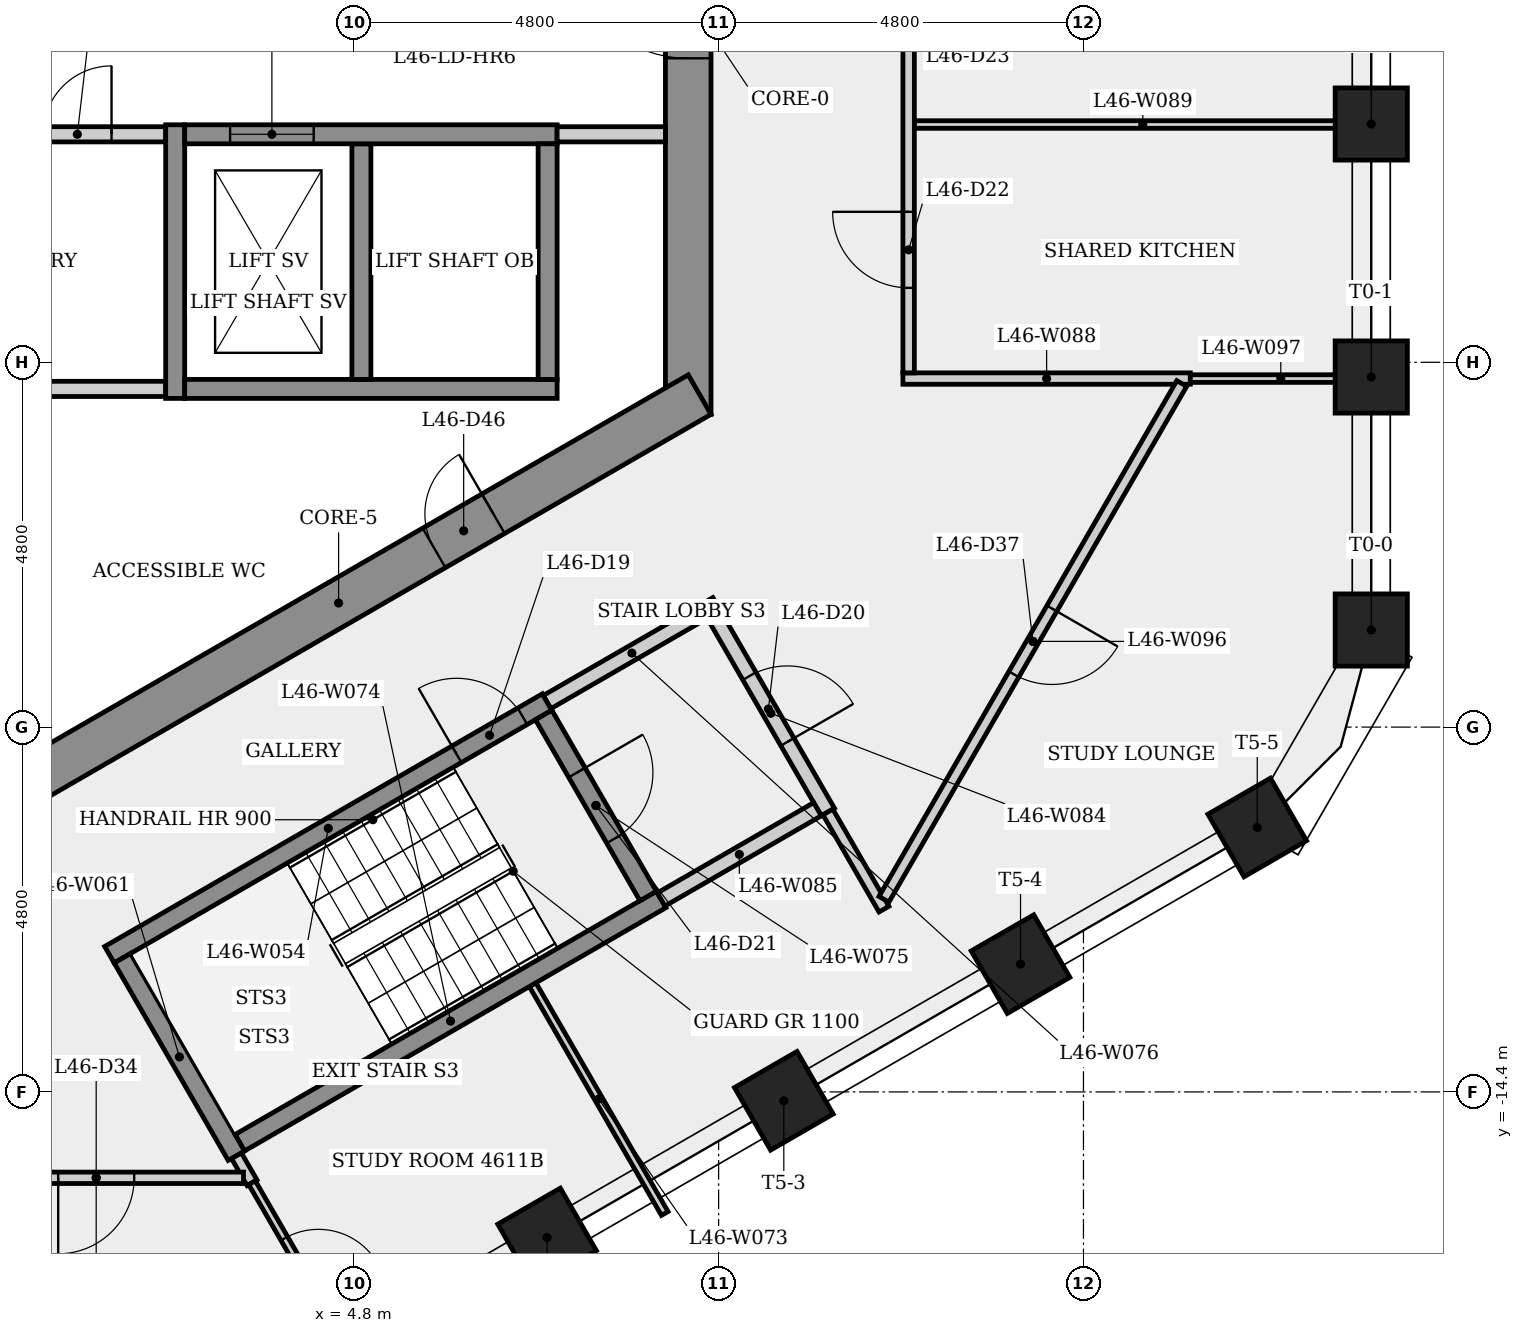
"""IFC4 building model, lengths in metres.
Left out: names, types, materials, properties, quantities, classifications, styles, units other than length and angle.
Written with IfcOpenShell. Run it as: python <this file> out.ifc"""

import sys

from ifc_helpers import new_model, si_unit, direction, frame, frame_2d, origin, origin_2d, place, context, subcontext, project, spatial, rectangle, extrude, element, fill, save


model = new_model("IFC4")
c1 = context("Model", 3, precision=1e-05, world=origin(), true_north=direction((0.0, 1.0)))
c2 = subcontext(c1, "Body", "Model", "MODEL_VIEW")
j1 = project(units=[si_unit("LENGTHUNIT", "METRE"), si_unit("PLANEANGLEUNIT", "RADIAN")], contexts=[c1])
p1 = place(None, origin())
s1 = spatial("IfcSite", under=j1, at=p1, CompositionType="ELEMENT")
p2 = place(p1, origin())
s2 = spatial("IfcBuilding", under=s1, at=p2, CompositionType="ELEMENT")
p3 = place(p2, frame((0.0, 0.0, 173.1)))
s3 = spatial("IfcBuildingStorey", under=s2, at=p3, CompositionType="ELEMENT", Elevation=173.1)
p4 = place(p3, frame((9.2, -5.485, 0.0), z_axis=(0.0, 0.0, 1.0), x_axis=(0.0, 1.0, 0.0)))
e1 = element("IfcWall", 1, at=p4, inside=s3, PredefinedType="SHEAR", context=c2, shape_type="SweptSolid", body=[
    extrude(rectangle(XDim=10.97, YDim=0.6, at=frame_2d((5.485, 0.0))), origin(), (0.0, 0.0, 1.0), 3.4),
])
p5 = place(p4, frame((4.685, 0.0, 0.0)))
e2 = element("IfcOpeningElement", 2, at=p5, cuts=e1, PredefinedType="OPENING", context=c2, shape_type="SweptSolid", body=[
    extrude(rectangle(XDim=1.6, YDim=2.1, at=frame_2d((0.8, 1.05))), frame((0.0, 0.31, 0.0), z_axis=(0.0, -1.0, 0.0), x_axis=(1.0, 0.0, 0.0)), (0.0, 0.0, 1.0), 0.62),
])
p6 = place(p3, frame((-0.15, -10.71, 0.0), z_axis=(0.0, 0.0, 1.0), x_axis=(0.866023993627, 0.500002442456, 0.0)))
e3 = element("IfcWall", 3, at=p6, inside=s3, PredefinedType="SHEAR", context=c2, shape_type="SweptSolid", body=[
    extrude(rectangle(XDim=10.97, YDim=0.6, at=frame_2d((5.485, 0.0))), origin(), (0.0, 0.0, 1.0), 3.4),
])
p7 = place(p6, frame((6.935, 0.0, 0.0)))
e4 = element("IfcOpeningElement", 4, at=p7, cuts=e3, PredefinedType="OPENING", context=c2, shape_type="SweptSolid", body=[
    extrude(rectangle(XDim=0.9, YDim=2.1, at=frame_2d((0.45, 1.05))), frame((0.0, 0.31, 0.0), z_axis=(0.0, -1.0, 0.0), x_axis=(1.0, 0.0, 0.0)), (0.0, 0.0, 1.0), 0.62),
])
for number, where, z_axis, x_axis in (
    (5, (18.187, -8.323, 0.0), (0.0, 0.0, 1.0), (1.0, 0.0, 0.0)),
    (6, (18.187, -4.993, 0.0), (0.0, 0.0, 1.0), (1.0, 0.0, 0.0)),
    (7, (18.187, -1.665, 0.0), (0.0, 0.0, 1.0), (1.0, 0.0, 0.0)),
    (8, (7.343, -16.315, 0.0), (0.0, 0.0, 1.0), (0.5, -0.866, 0.0)),
    (9, (10.458, -14.517, 0.0), (0.0, 0.0, 1.0), (0.5, -0.866, 0.0)),
    (10, (13.572, -12.719, 0.0), (0.0, 0.0, 1.0), (0.5, -0.866, 0.0)),
    (11, (16.687, -10.921, 0.0), (0.0, 0.0, 1.0), (0.5, -0.866, 0.0)),
):
    element("IfcColumn", number, at=place(p3, frame(where, z_axis=z_axis, x_axis=x_axis)), inside=s3, PredefinedType="COLUMN", context=c2, shape_type="SweptSolid", body=[
        extrude(rectangle(XDim=0.95, YDim=0.95, at=origin_2d()), origin(), (0.0, 0.0, 1.0), 3.4),
    ])
p8 = place(p3, frame((-8.88, -5.15, 0.0), z_axis=(0.0, 0.0, 1.0), x_axis=(1.0, 0.0, 0.0)))
e12 = element("IfcWall", 12, at=p8, inside=s3, PredefinedType="PARTITIONING", context=c2, shape_type="SweptSolid", body=[
    extrude(rectangle(XDim=11.205, YDim=0.2, at=frame_2d((5.603, 0.0))), origin(), (0.0, 0.0, 1.0), 3.05),
])
p9 = place(p3, frame((-8.9, -1.8, 0.0), z_axis=(0.0, 0.0, 1.0), x_axis=(1.0, 0.0, 0.0)))
e13 = element("IfcWall", 13, at=p9, inside=s3, PredefinedType="PARTITIONING", context=c2, shape_type="SweptSolid", body=[
    extrude(rectangle(XDim=11.225, YDim=0.2, at=frame_2d((5.613, 0.0))), origin(), (0.0, 0.0, 1.0), 3.05),
])
p10 = place(p9, frame((2.16, 0.0, 0.0)))
e14 = element("IfcOpeningElement", 14, at=p10, cuts=e13, PredefinedType="OPENING", context=c2, shape_type="SweptSolid", body=[
    extrude(rectangle(XDim=0.9, YDim=2.1, at=frame_2d((0.45, 1.05))), frame((0.0, 0.11, 0.0), z_axis=(0.0, -1.0, 0.0), x_axis=(1.0, 0.0, 0.0)), (0.0, 0.0, 1.0), 0.22),
])
p11 = place(p9, frame((6.61, 0.0, 0.0)))
e15 = element("IfcOpeningElement", 15, at=p11, cuts=e13, PredefinedType="OPENING", context=c2, shape_type="SweptSolid", body=[
    extrude(rectangle(XDim=0.9, YDim=2.1, at=frame_2d((0.45, 1.05))), frame((0.0, 0.11, 0.0), z_axis=(0.0, -1.0, 0.0), x_axis=(1.0, 0.0, 0.0)), (0.0, 0.0, 1.0), 0.22),
])
p12 = place(p9, frame((9.613, 0.0, 0.0)))
e16 = element("IfcOpeningElement", 16, at=p12, cuts=e13, PredefinedType="OPENING", context=c2, shape_type="SweptSolid", body=[
    extrude(rectangle(XDim=0.9, YDim=2.1, at=frame_2d((0.45, 1.05))), frame((0.0, 0.11, 0.0), z_axis=(0.0, -1.0, 0.0), x_axis=(1.0, 0.0, 0.0)), (0.0, 0.0, 1.0), 0.22),
])
p13 = place(p3, frame((1.585, -12.595, 0.0), z_axis=(0.0, 0.0, 1.0), x_axis=(0.866036417653, 0.499980922934, 0.0)))
e17 = element("IfcWall", 17, at=p13, inside=s3, PredefinedType="SHEAR", context=c2, shape_type="SweptSolid", body=[
    extrude(rectangle(XDim=6.65, YDim=0.25, at=frame_2d((3.325, 0.0))), origin(), (0.0, 0.0, 1.0), 3.05),
])
p14 = place(p13, frame((5.275, 0.0, 0.0)))
e18 = element("IfcOpeningElement", 18, at=p14, cuts=e17, PredefinedType="OPENING", context=c2, shape_type="SweptSolid", body=[
    extrude(rectangle(XDim=1.0, YDim=2.1, at=frame_2d((0.5, 1.05))), frame((0.0, 0.135, 0.0), z_axis=(0.0, -1.0, 0.0), x_axis=(1.0, 0.0, 0.0)), (0.0, 0.0, 1.0), 0.27),
])
p15 = place(p3, frame((2.45, -5.275, 0.0), z_axis=(0.0, 0.0, 1.0), x_axis=(0.0, 1.0, 0.0)))
e19 = element("IfcWall", 19, at=p15, inside=s3, PredefinedType="SHEAR", context=c2, shape_type="SweptSolid", body=[
    extrude(rectangle(XDim=3.6, YDim=0.25, at=frame_2d((1.8, 0.0))), origin(), (0.0, 0.0, 1.0), 3.05),
])
p16 = place(p3, frame((3.256, -15.239, 0.0), z_axis=(0.0, 0.0, 1.0), x_axis=(0.500030520673, -0.866007781949, 0.0)))
e20 = element("IfcWall", 20, at=p16, inside=s3, PredefinedType="PARTITIONING", context=c2, shape_type="SweptSolid", body=[
    extrude(rectangle(XDim=0.412, YDim=0.15, at=frame_2d((0.206, 0.0))), origin(), (0.0, 0.0, 1.0), 3.05),
])
p17 = place(p3, frame((3.256, -15.239, 0.0), z_axis=(0.0, 0.0, 1.0), x_axis=(-0.50002537861, 0.866010750942, 0.0)))
e21 = element("IfcWall", 21, at=p17, inside=s3, PredefinedType="SHEAR", context=c2, shape_type="SweptSolid", body=[
    extrude(rectangle(XDim=3.0, YDim=0.25, at=frame_2d((1.5, 0.0))), origin(), (0.0, 0.0, 1.0), 3.05),
])
p18 = place(p3, frame((3.349, -15.53, 0.0), z_axis=(0.0, 0.0, 1.0), x_axis=(-1.0, 0.0, 0.0)))
e22 = element("IfcWall", 22, at=p18, inside=s3, PredefinedType="PARTITIONING", context=c2, shape_type="SweptSolid", body=[
    extrude(rectangle(XDim=3.876, YDim=0.15, at=frame_2d((1.938, 0.0))), origin(), (0.0, 0.0, 1.0), 3.05),
])
p19 = place(p18, frame((1.438, 0.0, 0.0)))
e23 = element("IfcOpeningElement", 23, at=p19, cuts=e22, PredefinedType="OPENING", context=c2, shape_type="SweptSolid", body=[
    extrude(rectangle(XDim=1.0, YDim=2.1, at=frame_2d((0.5, 1.05))), frame((0.0, 0.085, 0.0), z_axis=(0.0, -1.0, 0.0), x_axis=(1.0, 0.0, 0.0)), (0.0, 0.0, 1.0), 0.17),
])
p20 = place(p3, frame((3.461, -15.595, 0.0), z_axis=(0.0, 0.0, 1.0), x_axis=(0.50000286006, -0.866023752521, 0.0)))
e24 = element("IfcWall", 24, at=p20, inside=s3, PredefinedType="PARTITIONING", context=c2, shape_type="SweptSolid", body=[
    extrude(rectangle(XDim=3.065, YDim=0.1, at=frame_2d((1.532, 0.0))), origin(), (0.0, 0.0, 1.0), 3.05),
])
p21 = place(p20, frame((0.847, 0.0, 0.0)))
e25 = element("IfcOpeningElement", 25, at=p21, cuts=e24, PredefinedType="OPENING", context=c2, shape_type="SweptSolid", body=[
    extrude(rectangle(XDim=0.9, YDim=2.1, at=frame_2d((0.45, 1.05))), frame((0.0, 0.06, 0.0), z_axis=(0.0, -1.0, 0.0), x_axis=(1.0, 0.0, 0.0)), (0.0, 0.0, 1.0), 0.12),
])
p22 = place(p3, frame((2.575, -5.15, 0.0), z_axis=(0.0, 0.0, 1.0), x_axis=(1.0, 0.0, 0.0)))
e26 = element("IfcWall", 26, at=p22, inside=s3, PredefinedType="SHEAR", context=c2, shape_type="SweptSolid", body=[
    extrude(rectangle(XDim=4.9, YDim=0.25, at=frame_2d((2.45, 0.0))), origin(), (0.0, 0.0, 1.0), 3.05),
])
p23 = place(p3, frame((4.9, -1.925, 0.0), z_axis=(0.0, 0.0, 1.0), x_axis=(0.0, -1.0, 0.0)))
e27 = element("IfcWall", 27, at=p23, inside=s3, PredefinedType="SHEAR", context=c2, shape_type="SweptSolid", body=[
    extrude(rectangle(XDim=3.1, YDim=0.25, at=frame_2d((1.55, 0.0))), origin(), (0.0, 0.0, 1.0), 3.4),
])
p24 = place(p3, frame((2.575, -1.8, 0.0), z_axis=(0.0, 0.0, 1.0), x_axis=(1.0, 0.0, 0.0)))
e28 = element("IfcWall", 28, at=p24, inside=s3, PredefinedType="SHEAR", context=c2, shape_type="SweptSolid", body=[
    extrude(rectangle(XDim=4.9, YDim=0.25, at=frame_2d((2.45, 0.0))), origin(), (0.0, 0.0, 1.0), 3.05),
])
p25 = place(p24, frame((0.597, 0.0, 0.0)))
e29 = element("IfcOpeningElement", 29, at=p25, cuts=e28, PredefinedType="OPENING", context=c2, shape_type="SweptSolid", body=[
    extrude(rectangle(XDim=1.1, YDim=2.1, at=frame_2d((0.55, 1.05))), frame((0.0, 0.135, 0.0), z_axis=(0.0, -1.0, 0.0), x_axis=(1.0, 0.0, 0.0)), (0.0, 0.0, 1.0), 0.27),
])
p26 = place(p3, frame((7.153, -12.989, 0.0), z_axis=(0.0, 0.0, 1.0), x_axis=(0.500006134913, -0.866021861762, 0.0)))
e30 = element("IfcWall", 30, at=p26, inside=s3, PredefinedType="PARTITIONING", context=c2, shape_type="SweptSolid", body=[
    extrude(rectangle(XDim=3.477, YDim=0.1, at=frame_2d((1.738, 0.0))), origin(), (0.0, 0.0, 1.0), 3.05),
])
p27 = place(p3, frame((3.301, -15.068, 0.0), z_axis=(0.0, 0.0, 1.0), x_axis=(0.866035036182, 0.499983315828, 0.0)))
e31 = element("IfcWall", 31, at=p27, inside=s3, PredefinedType="SHEAR", context=c2, shape_type="SweptSolid", body=[
    extrude(rectangle(XDim=6.4, YDim=0.25, at=frame_2d((3.2, 0.0))), origin(), (0.0, 0.0, 1.0), 3.05),
])
p28 = place(p3, frame((7.298, -9.441, 0.0), z_axis=(0.0, 0.0, 1.0), x_axis=(0.500034990121, -0.866005201286, 0.0)))
e32 = element("IfcWall", 32, at=p28, inside=s3, PredefinedType="SHEAR", context=c2, shape_type="SweptSolid", body=[
    extrude(rectangle(XDim=2.75, YDim=0.25, at=frame_2d((1.375, 0.0))), origin(), (0.0, 0.0, 1.0), 3.05),
])
p29 = place(p28, frame((0.875, 0.0, 0.0)))
e33 = element("IfcOpeningElement", 33, at=p29, cuts=e32, PredefinedType="OPENING", context=c2, shape_type="SweptSolid", body=[
    extrude(rectangle(XDim=1.0, YDim=2.1, at=frame_2d((0.5, 1.05))), frame((0.0, 0.135, 0.0), z_axis=(0.0, -1.0, 0.0), x_axis=(1.0, 0.0, 0.0)), (0.0, 0.0, 1.0), 0.27),
])
p30 = place(p3, frame((7.344, -9.27, 0.0), z_axis=(0.0, 0.0, 1.0), x_axis=(0.866005588531, 0.500034319456, 0.0)))
e34 = element("IfcWall", 34, at=p30, inside=s3, PredefinedType="PARTITIONING", context=c2, shape_type="SweptSolid", body=[
    extrude(rectangle(XDim=2.575, YDim=0.2, at=frame_2d((1.288, 0.0))), origin(), (0.0, 0.0, 1.0), 3.05),
])
p31 = place(p3, frame((7.35, -1.925, 0.0), z_axis=(0.0, 0.0, 1.0), x_axis=(0.0, -1.0, 0.0)))
e35 = element("IfcWall", 35, at=p31, inside=s3, PredefinedType="SHEAR", context=c2, shape_type="SweptSolid", body=[
    extrude(rectangle(XDim=3.1, YDim=0.25, at=frame_2d((1.55, 0.0))), origin(), (0.0, 0.0, 1.0), 3.4),
])
p32 = place(p3, frame((8.9, -1.8, 0.0), z_axis=(0.0, 0.0, 1.0), x_axis=(-1.0, 0.0, 0.0)))
e36 = element("IfcWall", 36, at=p32, inside=s3, PredefinedType="PARTITIONING", context=c2, shape_type="SweptSolid", body=[
    extrude(rectangle(XDim=1.425, YDim=0.2, at=frame_2d((0.712, 0.0))), origin(), (0.0, 0.0, 1.0), 3.05),
])
p33 = place(p3, frame((9.537, -8.119, 0.0), z_axis=(0.0, 0.0, 1.0), x_axis=(0.499990139034, -0.866031096941, 0.0)))
e37 = element("IfcWall", 37, at=p33, inside=s3, PredefinedType="PARTITIONING", context=c2, shape_type="SweptSolid", body=[
    extrude(rectangle(XDim=3.0, YDim=0.2, at=frame_2d((1.5, 0.0))), origin(), (0.0, 0.0, 1.0), 3.05),
])
p34 = place(p33, frame((0.935, 0.0, 0.0)))
e38 = element("IfcOpeningElement", 38, at=p34, cuts=e37, PredefinedType="OPENING", context=c2, shape_type="SweptSolid", body=[
    extrude(rectangle(XDim=1.0, YDim=2.1, at=frame_2d((0.5, 1.05))), frame((0.0, 0.11, 0.0), z_axis=(0.0, -1.0, 0.0), x_axis=(1.0, 0.0, 0.0)), (0.0, 0.0, 1.0), 0.22),
])
p35 = place(p3, frame((10.901, -10.681, 0.0), z_axis=(0.0, 0.0, 1.0), x_axis=(-0.866007538022, -0.500030943131, 0.0)))
e39 = element("IfcWall", 39, at=p35, inside=s3, PredefinedType="PARTITIONING", context=c2, shape_type="SweptSolid", body=[
    extrude(rectangle(XDim=2.375, YDim=0.2, at=frame_2d((1.188, 0.0))), origin(), (0.0, 0.0, 1.0), 3.05),
])
p36 = place(p3, frame((11.775, -11.995, 0.0), z_axis=(0.0, 0.0, 1.0), x_axis=(-0.499875190247, 0.866097450739, 0.0)))
e40 = element("IfcWall", 40, at=p36, inside=s3, PredefinedType="PARTITIONING", context=c2, shape_type="SweptSolid", body=[
    extrude(rectangle(XDim=1.476, YDim=0.15, at=frame_2d((0.738, 0.0))), origin(), (0.0, 0.0, 1.0), 3.05),
])
p37 = place(p3, frame((12.025, -5.014, 0.0), z_axis=(0.0, 0.0, 1.0), x_axis=(1.0, 0.0, 0.0)))
e41 = element("IfcWall", 41, at=p37, inside=s3, PredefinedType="PARTITIONING", context=c2, shape_type="SweptSolid", body=[
    extrude(rectangle(XDim=3.781, YDim=0.15, at=frame_2d((1.891, 0.0))), origin(), (0.0, 0.0, 1.0), 3.05),
])
p38 = place(p3, frame((12.175, -1.671, 0.0), z_axis=(0.0, 0.0, 1.0), x_axis=(1.0, 0.0, 0.0)))
e42 = element("IfcWall", 42, at=p38, inside=s3, PredefinedType="PARTITIONING", context=c2, shape_type="SweptSolid", body=[
    extrude(rectangle(XDim=6.011, YDim=0.1, at=frame_2d((3.006, 0.0))), origin(), (0.0, 0.0, 1.0), 3.05),
])
p39 = place(p3, frame((12.1, -4.939, 0.0), z_axis=(0.0, 0.0, 1.0), x_axis=(0.0, 1.0, 0.0)))
e43 = element("IfcWall", 43, at=p39, inside=s3, PredefinedType="PARTITIONING", context=c2, shape_type="SweptSolid", body=[
    extrude(rectangle(XDim=10.028, YDim=0.15, at=frame_2d((5.014, 0.0))), origin(), (0.0, 0.0, 1.0), 3.05),
])
p40 = place(p39, frame((1.119, 0.0, 0.0)))
e44 = element("IfcOpeningElement", 44, at=p40, cuts=e43, PredefinedType="OPENING", context=c2, shape_type="SweptSolid", body=[
    extrude(rectangle(XDim=1.0, YDim=2.1, at=frame_2d((0.5, 1.05))), frame((0.0, 0.085, 0.0), z_axis=(0.0, -1.0, 0.0), x_axis=(1.0, 0.0, 0.0)), (0.0, 0.0, 1.0), 0.17),
])
p41 = place(p39, frame((4.439, 0.0, 0.0)))
e45 = element("IfcOpeningElement", 45, at=p41, cuts=e43, PredefinedType="OPENING", context=c2, shape_type="SweptSolid", body=[
    extrude(rectangle(XDim=1.0, YDim=2.1, at=frame_2d((0.5, 1.05))), frame((0.0, 0.085, 0.0), z_axis=(0.0, -1.0, 0.0), x_axis=(1.0, 0.0, 0.0)), (0.0, 0.0, 1.0), 0.17),
])
p42 = place(p39, frame((7.782, 0.0, 0.0)))
e46 = element("IfcOpeningElement", 46, at=p42, cuts=e43, PredefinedType="OPENING", context=c2, shape_type="SweptSolid", body=[
    extrude(rectangle(XDim=1.0, YDim=2.1, at=frame_2d((0.5, 1.05))), frame((0.0, 0.085, 0.0), z_axis=(0.0, -1.0, 0.0), x_axis=(1.0, 0.0, 0.0)), (0.0, 0.0, 1.0), 0.17),
])
p43 = place(p3, frame((15.693, -5.079, 0.0), z_axis=(0.0, 0.0, 1.0), x_axis=(-0.500009219579, -0.866020080793, 0.0)))
e47 = element("IfcWall", 47, at=p43, inside=s3, PredefinedType="PARTITIONING", context=c2, shape_type="SweptSolid", body=[
    extrude(rectangle(XDim=7.836, YDim=0.15, at=frame_2d((3.918, 0.0))), origin(), (0.0, 0.0, 1.0), 3.05),
])
p44 = place(p43, frame((3.418, 0.0, 0.0)))
e48 = element("IfcOpeningElement", 48, at=p44, cuts=e47, PredefinedType="OPENING", context=c2, shape_type="SweptSolid", body=[
    extrude(rectangle(XDim=1.0, YDim=2.1, at=frame_2d((0.5, 1.05))), frame((0.0, 0.085, 0.0), z_axis=(0.0, -1.0, 0.0), x_axis=(1.0, 0.0, 0.0)), (0.0, 0.0, 1.0), 0.17),
])
p45 = place(p3, frame((18.187, -5.014, 0.0), z_axis=(0.0, 0.0, 1.0), x_axis=(-1.0, 0.0, 0.0)))
e49 = element("IfcWall", 49, at=p45, inside=s3, PredefinedType="PARTITIONING", context=c2, shape_type="SweptSolid", body=[
    extrude(rectangle(XDim=2.381, YDim=0.1, at=frame_2d((1.19, 0.0))), origin(), (0.0, 0.0, 1.0), 3.05),
])
p46 = place(p25, origin())
e50 = element("IfcDoor", 50, at=p46, inside=s3, OperationType="SLIDING_TO_LEFT", PredefinedType="DOOR", context=c2, shape_type="SweptSolid", body=[
    extrude(rectangle(XDim=1.1, YDim=2.1, at=frame_2d((0.55, 1.05))), frame((0.0, 0.025, 0.0), z_axis=(0.0, -1.0, 0.0), x_axis=(1.0, 0.0, 0.0)), (0.0, 0.0, 1.0), 0.05),
])
fill(e29, e50)
p47 = place(p12, origin())
e51 = element("IfcDoor", 51, at=p47, inside=s3, OperationType="SINGLE_SWING_RIGHT", PredefinedType="DOOR", context=c2, shape_type="SweptSolid", body=[
    extrude(rectangle(XDim=0.9, YDim=2.1, at=frame_2d((0.45, 1.05))), frame((0.0, 0.025, 0.0), z_axis=(0.0, -1.0, 0.0), x_axis=(1.0, 0.0, 0.0)), (0.0, 0.0, 1.0), 0.05),
])
fill(e16, e51)
p48 = place(p14, origin())
e52 = element("IfcDoor", 52, at=p48, inside=s3, OperationType="SINGLE_SWING_LEFT", PredefinedType="DOOR", context=c2, shape_type="SweptSolid", body=[
    extrude(rectangle(XDim=1.0, YDim=2.1, at=frame_2d((0.5, 1.05))), frame((0.0, 0.025, 0.0), z_axis=(0.0, -1.0, 0.0), x_axis=(1.0, 0.0, 0.0)), (0.0, 0.0, 1.0), 0.05),
])
fill(e18, e52)
p49 = place(p34, origin())
e53 = element("IfcDoor", 53, at=p49, inside=s3, OperationType="SINGLE_SWING_RIGHT", PredefinedType="DOOR", context=c2, shape_type="SweptSolid", body=[
    extrude(rectangle(XDim=1.0, YDim=2.1, at=frame_2d((0.5, 1.05))), frame((0.0, 0.025, 0.0), z_axis=(0.0, -1.0, 0.0), x_axis=(1.0, 0.0, 0.0)), (0.0, 0.0, 1.0), 0.05),
])
fill(e38, e53)
p50 = place(p29, origin())
e54 = element("IfcDoor", 54, at=p50, inside=s3, OperationType="SINGLE_SWING_LEFT", PredefinedType="DOOR", context=c2, shape_type="SweptSolid", body=[
    extrude(rectangle(XDim=1.0, YDim=2.1, at=frame_2d((0.5, 1.05))), frame((0.0, 0.025, 0.0), z_axis=(0.0, -1.0, 0.0), x_axis=(1.0, 0.0, 0.0)), (0.0, 0.0, 1.0), 0.05),
])
fill(e33, e54)
p51 = place(p40, origin())
e55 = element("IfcDoor", 55, at=p51, inside=s3, OperationType="SINGLE_SWING_RIGHT", PredefinedType="DOOR", context=c2, shape_type="SweptSolid", body=[
    extrude(rectangle(XDim=1.0, YDim=2.1, at=frame_2d((0.5, 1.05))), frame((0.0, 0.025, 0.0), z_axis=(0.0, -1.0, 0.0), x_axis=(1.0, 0.0, 0.0)), (0.0, 0.0, 1.0), 0.05),
])
fill(e44, e55)
p52 = place(p19, origin())
e56 = element("IfcDoor", 56, at=p52, inside=s3, OperationType="SINGLE_SWING_RIGHT", PredefinedType="DOOR", context=c2, shape_type="SweptSolid", body=[
    extrude(rectangle(XDim=1.0, YDim=2.1, at=frame_2d((0.5, 1.05))), frame((0.0, 0.025, 0.0), z_axis=(0.0, -1.0, 0.0), x_axis=(1.0, 0.0, 0.0)), (0.0, 0.0, 1.0), 0.05),
])
fill(e23, e56)
p53 = place(p21, origin())
e57 = element("IfcDoor", 57, at=p53, inside=s3, OperationType="SINGLE_SWING_RIGHT", PredefinedType="DOOR", context=c2, shape_type="SweptSolid", body=[
    extrude(rectangle(XDim=0.9, YDim=2.1, at=frame_2d((0.45, 1.05))), frame((0.0, 0.025, 0.0), z_axis=(0.0, -1.0, 0.0), x_axis=(1.0, 0.0, 0.0)), (0.0, 0.0, 1.0), 0.05),
])
fill(e25, e57)
p54 = place(p44, origin())
e58 = element("IfcDoor", 58, at=p54, inside=s3, OperationType="SINGLE_SWING_LEFT", PredefinedType="DOOR", context=c2, shape_type="SweptSolid", body=[
    extrude(rectangle(XDim=1.0, YDim=2.1, at=frame_2d((0.5, 1.05))), frame((0.0, 0.025, 0.0), z_axis=(0.0, -1.0, 0.0), x_axis=(1.0, 0.0, 0.0)), (0.0, 0.0, 1.0), 0.05),
])
fill(e48, e58)
p55 = place(p7, origin())
e59 = element("IfcDoor", 59, at=p55, inside=s3, OperationType="SINGLE_SWING_RIGHT", PredefinedType="DOOR", context=c2, shape_type="SweptSolid", body=[
    extrude(rectangle(XDim=0.9, YDim=2.1, at=frame_2d((0.45, 1.05))), frame((0.0, 0.025, 0.0), z_axis=(0.0, -1.0, 0.0), x_axis=(1.0, 0.0, 0.0)), (0.0, 0.0, 1.0), 0.05),
])
fill(e4, e59)
p56 = place(p5, origin())
e60 = element("IfcDoor", 60, at=p56, inside=s3, OperationType="SINGLE_SWING_RIGHT", PredefinedType="DOOR", context=c2, shape_type="SweptSolid", body=[
    extrude(rectangle(XDim=1.6, YDim=2.1, at=frame_2d((0.8, 1.05))), frame((0.0, 0.025, 0.0), z_axis=(0.0, -1.0, 0.0), x_axis=(1.0, 0.0, 0.0)), (0.0, 0.0, 1.0), 0.05),
])
fill(e2, e60)
save(model, sys.argv[1])
